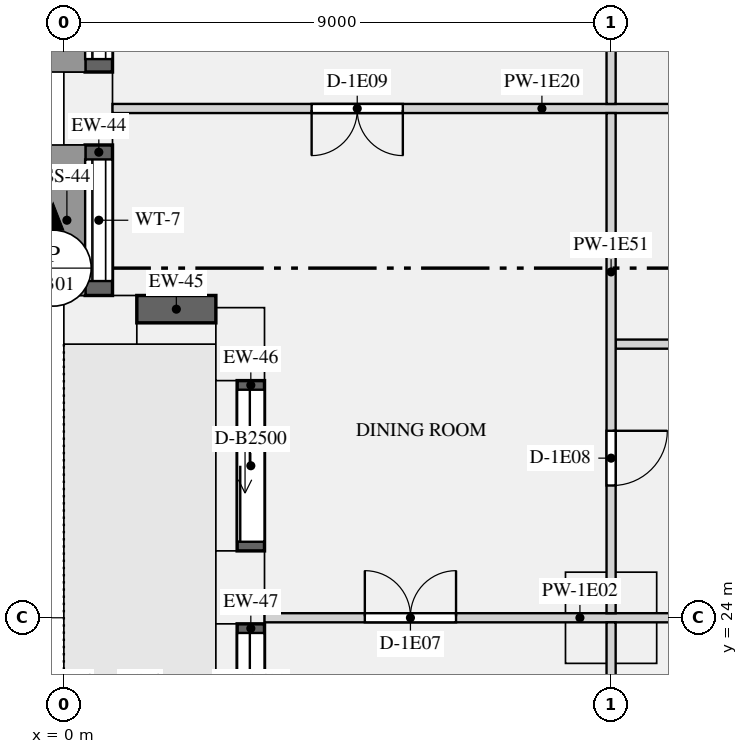
"""IFC4 building model, lengths in metres.
Left out: names, types, materials, properties, quantities, classifications, styles, units other than length and angle.
Written with IfcOpenShell. Run it as: python <this file> out.ifc"""

import sys

from ifc_helpers import new_model, si_unit, direction, frame, frame_2d, origin, origin_2d, place, context, subcontext, project, spatial, rectangle, extrude, element, fill, save


model = new_model("IFC4")
c1 = context("Model", 3, precision=1e-05, world=origin(), true_north=direction((0.0, 1.0)))
c2 = subcontext(c1, "Body", "Model", "MODEL_VIEW")
j1 = project(units=[si_unit("LENGTHUNIT", "METRE"), si_unit("PLANEANGLEUNIT", "RADIAN")], contexts=[c1])
p1 = place(None, origin())
s1 = spatial("IfcSite", under=j1, at=p1, CompositionType="ELEMENT")
p2 = place(p1, origin())
s2 = spatial("IfcBuilding", under=s1, at=p2, CompositionType="ELEMENT")
p3 = place(p2, frame((0.0, 0.0, 54.15)))
s3 = spatial("IfcBuildingStorey", under=s2, at=p3, CompositionType="ELEMENT", Elevation=54.15)
for number, where, z_axis, x_axis in (
    (1, (0.4, 32.375, 0.0), (0.0, 0.0, 1.0), (0.0, -1.0, 0.0)),
    (2, (0.6, 28.9, 0.0), (0.0, 0.0, 1.0), (1.0, 0.0, 0.0)),
    (3, (2.9, 28.5, 0.0), (0.0, 0.0, 1.0), (0.0, -1.0, 0.0)),
    (4, (2.9, 24.5, 0.0), (0.0, 0.0, 1.0), (0.0, -1.0, 0.0)),
):
    element("IfcColumn", number, at=place(p3, frame(where, z_axis=z_axis, x_axis=x_axis)), inside=s3, PredefinedType="USERDEFINED", context=c2, shape_type="SweptSolid", body=[
        extrude(rectangle(XDim=1.2, YDim=0.8, at=origin_2d()), origin(), (0.0, 0.0, 1.0), 3.15),
    ])
p4 = place(p3, frame((9.0, 24.0, 0.0), z_axis=(0.0, 0.0, 1.0), x_axis=(1.0, 0.0, 0.0)))
e5 = element("IfcColumn", 5, at=p4, inside=s3, PredefinedType="COLUMN", context=c2, shape_type="SweptSolid", body=[
    extrude(rectangle(XDim=1.5, YDim=1.5, at=origin_2d()), origin(), (0.0, 0.0, 1.0), 3.15),
])
p5 = place(p3, frame((0.575, 35.65, 0.9), z_axis=(0.0, 0.0, 1.0), x_axis=(0.0, -1.0, 0.0)))
e6 = element("IfcWall", 6, at=p5, inside=s3, PredefinedType="SOLIDWALL", context=c2, shape_type="SweptSolid", body=[
    extrude(rectangle(XDim=2.675, YDim=0.45, at=frame_2d((1.337, 0.0))), origin(), (0.0, 0.0, 1.0), 1.93),
])
p6 = place(p5, frame((0.212, 0.0, 0.15)))
e7 = element("IfcOpeningElement", 7, at=p6, cuts=e6, PredefinedType="OPENING", context=c2, shape_type="SweptSolid", body=[
    extrude(rectangle(XDim=2.25, YDim=1.5, at=frame_2d((1.125, 0.75))), frame((0.0, 0.235, 0.0), z_axis=(0.0, -1.0, 0.0), x_axis=(1.0, 0.0, 0.0)), (0.0, 0.0, 1.0), 0.47),
])
p7 = place(p3, frame((0.575, 31.775, 0.9), z_axis=(0.0, 0.0, 1.0), x_axis=(0.0, -1.0, 0.0)))
e8 = element("IfcWall", 8, at=p7, inside=s3, PredefinedType="SOLIDWALL", context=c2, shape_type="SweptSolid", body=[
    extrude(rectangle(XDim=2.475, YDim=0.45, at=frame_2d((1.237, 0.0))), origin(), (0.0, 0.0, 1.0), 1.93),
])
p8 = place(p7, frame((0.238, 0.0, 0.15)))
e9 = element("IfcOpeningElement", 9, at=p8, cuts=e8, PredefinedType="OPENING", context=c2, shape_type="SweptSolid", body=[
    extrude(rectangle(XDim=2.0, YDim=1.5, at=frame_2d((1.0, 0.75))), frame((0.0, 0.235, 0.0), z_axis=(0.0, -1.0, 0.0), x_axis=(1.0, 0.0, 0.0)), (0.0, 0.0, 1.0), 0.47),
])
p9 = place(p3, frame((1.2, 29.075, 0.9), z_axis=(0.0, 0.0, 1.0), x_axis=(1.0, 0.0, 0.0)))
e10 = element("IfcWall", 10, at=p9, inside=s3, PredefinedType="SOLIDWALL", context=c2, shape_type="SweptSolid", body=[
    extrude(rectangle(XDim=1.3, YDim=0.45, at=frame_2d((0.65, 0.0))), origin(), (0.0, 0.0, 1.0), 1.93),
])
p10 = place(p3, frame((3.075, 27.9, 0.0), z_axis=(0.0, 0.0, 1.0), x_axis=(0.0, -1.0, 0.0)))
e11 = element("IfcWall", 11, at=p10, inside=s3, PredefinedType="SOLIDWALL", context=c2, shape_type="SweptSolid", body=[
    extrude(rectangle(XDim=2.8, YDim=0.45, at=frame_2d((1.4, 0.0))), origin(), (0.0, 0.0, 1.0), 2.83),
])
p11 = place(p10, frame((0.15, 0.0, 0.0)))
e12 = element("IfcOpeningElement", 12, at=p11, cuts=e11, PredefinedType="OPENING", context=c2, shape_type="SweptSolid", body=[
    extrude(rectangle(XDim=2.5, YDim=2.3, at=frame_2d((1.25, 1.15))), frame((0.0, 0.235, 0.0), z_axis=(0.0, -1.0, 0.0), x_axis=(1.0, 0.0, 0.0)), (0.0, 0.0, 1.0), 0.47),
])
p12 = place(p3, frame((3.075, 23.9, 0.0), z_axis=(0.0, 0.0, 1.0), x_axis=(0.0, -1.0, 0.0)))
e13 = element("IfcWall", 13, at=p12, inside=s3, PredefinedType="SOLIDWALL", context=c2, shape_type="SweptSolid", body=[
    extrude(rectangle(XDim=2.8, YDim=0.45, at=frame_2d((1.4, 0.0))), origin(), (0.0, 0.0, 1.0), 2.83),
])
p13 = place(p12, frame((0.15, 0.0, 0.0)))
e14 = element("IfcOpeningElement", 14, at=p13, cuts=e13, PredefinedType="OPENING", context=c2, shape_type="SweptSolid", body=[
    extrude(rectangle(XDim=2.5, YDim=2.3, at=frame_2d((1.25, 1.15))), frame((0.0, 0.235, 0.0), z_axis=(0.0, -1.0, 0.0), x_axis=(1.0, 0.0, 0.0)), (0.0, 0.0, 1.0), 0.47),
])
p14 = place(p3, frame((3.3, 24.0, 0.0), z_axis=(0.0, 0.0, 1.0), x_axis=(1.0, 0.0, 0.0)))
e15 = element("IfcWall", 15, at=p14, inside=s3, PredefinedType="PARTITIONING", context=c2, shape_type="SweptSolid", body=[
    extrude(rectangle(XDim=8.8, YDim=0.15, at=frame_2d((4.4, 0.0))), origin(), (0.0, 0.0, 1.0), 2.83),
])
p15 = place(p14, frame((1.65, 0.0, 0.0)))
e16 = element("IfcOpeningElement", 16, at=p15, cuts=e15, PredefinedType="OPENING", context=c2, shape_type="SweptSolid", body=[
    extrude(rectangle(XDim=1.5, YDim=2.1, at=frame_2d((0.75, 1.05))), frame((0.0, 0.085, 0.0), z_axis=(0.0, -1.0, 0.0), x_axis=(1.0, 0.0, 0.0)), (0.0, 0.0, 1.0), 0.17),
])
p16 = place(p14, frame((7.225, 0.0, 0.0)))
e17 = element("IfcOpeningElement", 17, at=p16, cuts=e15, PredefinedType="OPENING", context=c2, shape_type="SweptSolid", body=[
    extrude(rectangle(XDim=0.9, YDim=2.1, at=frame_2d((0.45, 1.05))), frame((0.0, 0.085, 0.0), z_axis=(0.0, -1.0, 0.0), x_axis=(1.0, 0.0, 0.0)), (0.0, 0.0, 1.0), 0.17),
])
p17 = place(p3, frame((0.8, 32.375, 0.0), z_axis=(0.0, 0.0, 1.0), x_axis=(1.0, 0.0, 0.0)))
e18 = element("IfcWall", 18, at=p17, inside=s3, PredefinedType="PARTITIONING", context=c2, shape_type="SweptSolid", body=[
    extrude(rectangle(XDim=11.4, YDim=0.15, at=frame_2d((5.7, 0.0))), origin(), (0.0, 0.0, 1.0), 2.83),
])
p18 = place(p17, frame((3.275, 0.0, 0.0)))
e19 = element("IfcOpeningElement", 19, at=p18, cuts=e18, PredefinedType="OPENING", context=c2, shape_type="SweptSolid", body=[
    extrude(rectangle(XDim=1.5, YDim=2.1, at=frame_2d((0.75, 1.05))), frame((0.0, 0.085, 0.0), z_axis=(0.0, -1.0, 0.0), x_axis=(1.0, 0.0, 0.0)), (0.0, 0.0, 1.0), 0.17),
])
p19 = place(p17, frame((9.35, 0.0, 0.0)))
e20 = element("IfcOpeningElement", 20, at=p19, cuts=e18, PredefinedType="OPENING", context=c2, shape_type="SweptSolid", body=[
    extrude(rectangle(XDim=0.9, YDim=2.1, at=frame_2d((0.45, 1.05))), frame((0.0, 0.085, 0.0), z_axis=(0.0, -1.0, 0.0), x_axis=(1.0, 0.0, 0.0)), (0.0, 0.0, 1.0), 0.17),
])
p20 = place(p3, frame((9.075, 28.5, 0.0), z_axis=(0.0, 0.0, 1.0), x_axis=(1.0, 0.0, 0.0)))
e21 = element("IfcWall", 21, at=p20, inside=s3, PredefinedType="PARTITIONING", context=c2, shape_type="SweptSolid", body=[
    extrude(rectangle(XDim=3.125, YDim=0.15, at=frame_2d((1.562, 0.0))), origin(), (0.0, 0.0, 1.0), 2.83),
])
p21 = place(p20, frame((1.075, 0.0, 0.0)))
e22 = element("IfcOpeningElement", 22, at=p21, cuts=e21, PredefinedType="OPENING", context=c2, shape_type="SweptSolid", body=[
    extrude(rectangle(XDim=0.9, YDim=2.1, at=frame_2d((0.45, 1.05))), frame((0.0, 0.085, 0.0), z_axis=(0.0, -1.0, 0.0), x_axis=(1.0, 0.0, 0.0)), (0.0, 0.0, 1.0), 0.17),
])
p22 = place(p3, frame((9.0, 12.575, 0.0), z_axis=(0.0, 0.0, 1.0), x_axis=(0.0, 1.0, 0.0)))
e23 = element("IfcWall", 23, at=p22, inside=s3, PredefinedType="PARTITIONING", context=c2, shape_type="SweptSolid", body=[
    extrude(rectangle(XDim=11.35, YDim=0.15, at=frame_2d((5.675, 0.0))), origin(), (0.0, 0.0, 1.0), 2.83),
])
p23 = place(p22, frame((6.85, 0.0, 0.0)))
e24 = element("IfcOpeningElement", 24, at=p23, cuts=e23, PredefinedType="OPENING", context=c2, shape_type="SweptSolid", body=[
    extrude(rectangle(XDim=0.9, YDim=2.1, at=frame_2d((0.45, 1.05))), frame((0.0, 0.085, 0.0), z_axis=(0.0, -1.0, 0.0), x_axis=(1.0, 0.0, 0.0)), (0.0, 0.0, 1.0), 0.17),
])
p24 = place(p3, frame((9.0, 24.075, 0.0), z_axis=(0.0, 0.0, 1.0), x_axis=(0.0, 1.0, 0.0)))
e25 = element("IfcWall", 25, at=p24, inside=s3, PredefinedType="PARTITIONING", context=c2, shape_type="SweptSolid", body=[
    extrude(rectangle(XDim=8.225, YDim=0.15, at=frame_2d((4.113, 0.0))), origin(), (0.0, 0.0, 1.0), 2.83),
])
p25 = place(p24, frame((2.1, 0.0, 0.0)))
e26 = element("IfcOpeningElement", 26, at=p25, cuts=e25, PredefinedType="OPENING", context=c2, shape_type="SweptSolid", body=[
    extrude(rectangle(XDim=0.9, YDim=2.1, at=frame_2d((0.45, 1.05))), frame((0.0, 0.085, 0.0), z_axis=(0.0, -1.0, 0.0), x_axis=(1.0, 0.0, 0.0)), (0.0, 0.0, 1.0), 0.17),
])
p26 = place(p3, frame((9.0, 32.45, 0.0), z_axis=(0.0, 0.0, 1.0), x_axis=(0.0, 1.0, 0.0)))
e27 = element("IfcWall", 27, at=p26, inside=s3, PredefinedType="PARTITIONING", context=c2, shape_type="SweptSolid", body=[
    extrude(rectangle(XDim=7.575, YDim=0.15, at=frame_2d((3.788, 0.0))), origin(), (0.0, 0.0, 1.0), 2.83),
])
p27 = place(p26, frame((4.988, 0.0, 0.0)))
e28 = element("IfcOpeningElement", 28, at=p27, cuts=e27, PredefinedType="OPENING", context=c2, shape_type="SweptSolid", body=[
    extrude(rectangle(XDim=1.5, YDim=2.1, at=frame_2d((0.75, 1.05))), frame((0.0, 0.085, 0.0), z_axis=(0.0, -1.0, 0.0), x_axis=(1.0, 0.0, 0.0)), (0.0, 0.0, 1.0), 0.17),
])
p28 = place(p6, origin())
e29 = element("IfcWindow", 29, at=p28, inside=s3, PartitioningType="SINGLE_PANEL", PredefinedType="WINDOW", context=c2, shape_type="SweptSolid", body=[
    extrude(rectangle(XDim=2.25, YDim=1.5, at=frame_2d((1.125, 0.75))), frame((0.0, -0.065, 0.0), z_axis=(0.0, -1.0, 0.0), x_axis=(1.0, 0.0, 0.0)), (0.0, 0.0, 1.0), 0.06),
])
fill(e7, e29)
p29 = place(p8, origin())
e30 = element("IfcWindow", 30, at=p29, inside=s3, PartitioningType="SINGLE_PANEL", PredefinedType="WINDOW", context=c2, shape_type="SweptSolid", body=[
    extrude(rectangle(XDim=2.0, YDim=1.5, at=frame_2d((1.0, 0.75))), frame((0.0, -0.065, 0.0), z_axis=(0.0, -1.0, 0.0), x_axis=(1.0, 0.0, 0.0)), (0.0, 0.0, 1.0), 0.06),
])
fill(e9, e30)
p30 = place(p11, origin())
e31 = element("IfcDoor", 31, at=p30, inside=s3, OperationType="SLIDING_TO_LEFT", PredefinedType="DOOR", context=c2, shape_type="SweptSolid", body=[
    extrude(rectangle(XDim=2.5, YDim=2.3, at=frame_2d((1.25, 1.15))), frame((0.0, -0.07, 0.0), z_axis=(0.0, -1.0, 0.0), x_axis=(1.0, 0.0, 0.0)), (0.0, 0.0, 1.0), 0.05),
])
fill(e12, e31)
p31 = place(p13, origin())
e32 = element("IfcDoor", 32, at=p31, inside=s3, OperationType="SLIDING_TO_LEFT", PredefinedType="DOOR", context=c2, shape_type="SweptSolid", body=[
    extrude(rectangle(XDim=2.5, YDim=2.3, at=frame_2d((1.25, 1.15))), frame((0.0, -0.07, 0.0), z_axis=(0.0, -1.0, 0.0), x_axis=(1.0, 0.0, 0.0)), (0.0, 0.0, 1.0), 0.05),
])
fill(e14, e32)
p32 = place(p15, origin())
e33 = element("IfcDoor", 33, at=p32, inside=s3, OperationType="DOUBLE_DOOR_SINGLE_SWING", PredefinedType="DOOR", context=c2, shape_type="SweptSolid", body=[
    extrude(rectangle(XDim=1.5, YDim=2.1, at=frame_2d((0.75, 1.05))), frame((0.0, 0.025, 0.0), z_axis=(0.0, -1.0, 0.0), x_axis=(1.0, 0.0, 0.0)), (0.0, 0.0, 1.0), 0.05),
])
fill(e16, e33)
p33 = place(p25, frame((0.9, 0.0, 0.0), z_axis=(0.0, 0.0, 1.0), x_axis=(-1.0, 0.0, 0.0)))
e34 = element("IfcDoor", 34, at=p33, inside=s3, OperationType="SINGLE_SWING_LEFT", PredefinedType="DOOR", context=c2, shape_type="SweptSolid", body=[
    extrude(rectangle(XDim=0.9, YDim=2.1, at=frame_2d((0.45, 1.05))), frame((0.0, 0.025, 0.0), z_axis=(0.0, -1.0, 0.0), x_axis=(1.0, 0.0, 0.0)), (0.0, 0.0, 1.0), 0.05),
])
fill(e26, e34)
p34 = place(p18, frame((1.5, 0.0, 0.0), z_axis=(0.0, 0.0, 1.0), x_axis=(-1.0, 0.0, 0.0)))
e35 = element("IfcDoor", 35, at=p34, inside=s3, OperationType="DOUBLE_DOOR_SINGLE_SWING", PredefinedType="DOOR", context=c2, shape_type="SweptSolid", body=[
    extrude(rectangle(XDim=1.5, YDim=2.1, at=frame_2d((0.75, 1.05))), frame((0.0, 0.025, 0.0), z_axis=(0.0, -1.0, 0.0), x_axis=(1.0, 0.0, 0.0)), (0.0, 0.0, 1.0), 0.05),
])
fill(e19, e35)
save(model, sys.argv[1])
